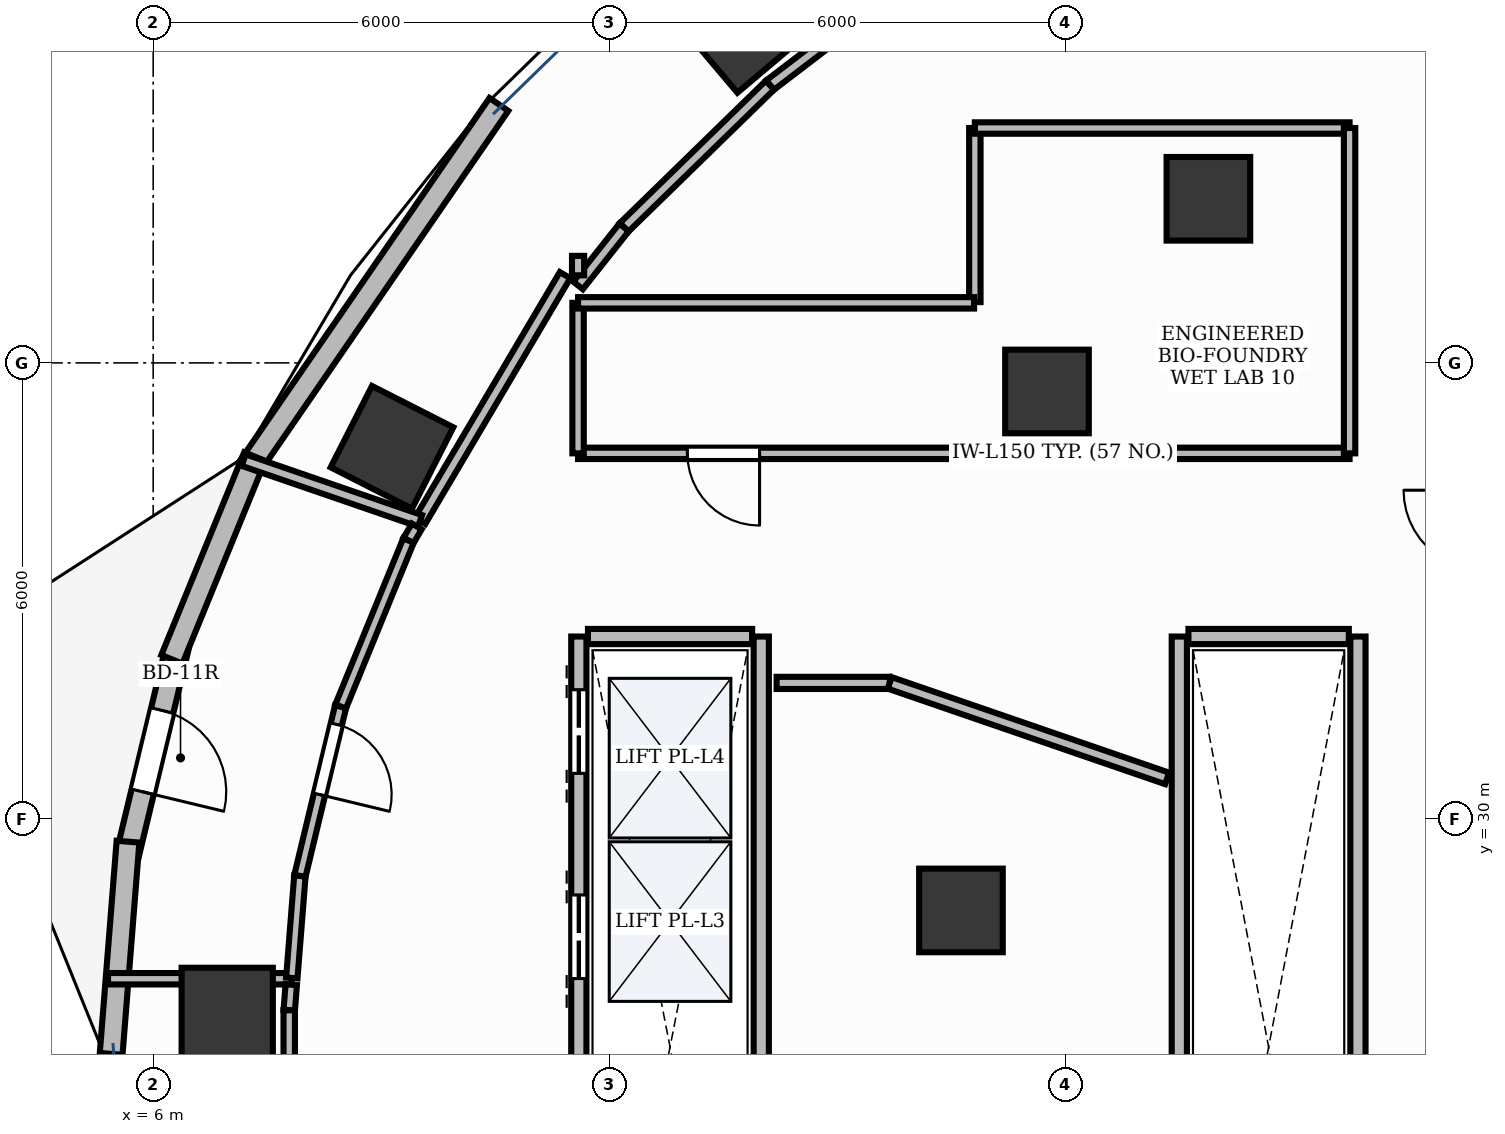
"""IFC4 building model, lengths in metres.
Left out: names, types, materials, properties, quantities, classifications, styles, units other than length and angle.
Written with IfcOpenShell. Run it as: python <this file> out.ifc"""

import sys

from ifc_helpers import new_model, si_unit, direction, frame, frame_2d, origin, origin_2d, place, context, subcontext, project, spatial, rectangle, extrude, element, fill, save


model = new_model("IFC4")
c1 = context("Model", 3, precision=1e-05, world=origin(), true_north=direction((0.0, 1.0)))
c2 = subcontext(c1, "Body", "Model", "MODEL_VIEW")
j1 = project(units=[si_unit("LENGTHUNIT", "METRE"), si_unit("PLANEANGLEUNIT", "RADIAN")], contexts=[c1])
p1 = place(None, origin())
s1 = spatial("IfcSite", under=j1, at=p1, CompositionType="ELEMENT")
p2 = place(p1, origin())
s2 = spatial("IfcBuilding", under=s1, at=p2, CompositionType="ELEMENT")
p3 = place(p2, frame((0.0, 0.0, 127.8)))
s3 = spatial("IfcBuildingStorey", under=s2, at=p3, CompositionType="ELEMENT", Elevation=127.8)
p4 = place(p3, frame((13.758, 40.4, -0.0), z_axis=(0.0, 0.0, 1.0), x_axis=(0.764246456939, 0.644924300253, 0.0)))
e1 = element("IfcColumn", 1, at=p4, inside=s3, PredefinedType="COLUMN", context=c2, shape_type="SweptSolid", body=[
    extrude(rectangle(XDim=1.2, YDim=1.2, at=origin_2d()), origin(), (0.0, 0.0, 1.0), 3.901),
])
p5 = place(p3, frame((19.883, 38.159, -0.0), z_axis=(0.0, 0.0, 1.0), x_axis=(1.0, 0.0, 0.0)))
e2 = element("IfcColumn", 2, at=p5, inside=s3, PredefinedType="COLUMN", context=c2, shape_type="SweptSolid", body=[
    extrude(rectangle(XDim=1.1, YDim=1.1, at=origin_2d()), origin(), (0.0, 0.0, 1.0), 3.901),
])
p6 = place(p3, frame((9.142, 34.889, -0.0), z_axis=(0.0, 0.0, 1.0), x_axis=(0.453057191132, 0.891481453292, 0.0)))
e3 = element("IfcColumn", 3, at=p6, inside=s3, PredefinedType="COLUMN", context=c2, shape_type="SweptSolid", body=[
    extrude(rectangle(XDim=1.2, YDim=1.2, at=origin_2d()), origin(), (0.0, 0.0, 1.0), 3.901),
])
p7 = place(p3, frame((17.759, 35.624, -0.0), z_axis=(0.0, 0.0, 1.0), x_axis=(1.0, 0.0, 0.0)))
e4 = element("IfcColumn", 4, at=p7, inside=s3, PredefinedType="COLUMN", context=c2, shape_type="SweptSolid", body=[
    extrude(rectangle(XDim=1.1, YDim=1.1, at=origin_2d()), origin(), (0.0, 0.0, 1.0), 3.901),
])
p8 = place(p3, frame((6.974, 27.442, -0.0), z_axis=(0.0, 0.0, 1.0), x_axis=(0.0, 1.0, 0.0)))
e5 = element("IfcColumn", 5, at=p8, inside=s3, PredefinedType="COLUMN", context=c2, shape_type="SweptSolid", body=[
    extrude(rectangle(XDim=1.2, YDim=1.2, at=origin_2d()), origin(), (0.0, 0.0, 1.0), 3.901),
])
p9 = place(p3, frame((16.627, 28.797, -0.0), z_axis=(0.0, 0.0, 1.0), x_axis=(1.0, 0.0, 0.0)))
e6 = element("IfcColumn", 6, at=p9, inside=s3, PredefinedType="COLUMN", context=c2, shape_type="SweptSolid", body=[
    extrude(rectangle(XDim=1.1, YDim=1.1, at=origin_2d()), origin(), (0.0, 0.0, 1.0), 3.901),
])
p10 = place(p3, frame((6.316, 32.248, 0.0), z_axis=(0.0, 0.0, 1.0), x_axis=(-0.233687533313, -0.972311748759, 0.0)))
e7 = element("IfcWall", 7, at=p10, inside=s3, PredefinedType="STANDARD", context=c2, shape_type="SweptSolid", body=[
    extrude(rectangle(XDim=2.788, YDim=0.3, at=frame_2d((1.394, 0.0))), origin(), (0.0, 0.0, 1.0), 3.9),
])
p11 = place(p10, frame((0.844, 0.0, 0.0)))
e8 = element("IfcOpeningElement", 8, at=p11, cuts=e7, PredefinedType="OPENING", context=c2, shape_type="SweptSolid", body=[
    extrude(rectangle(XDim=1.1, YDim=2.15, at=frame_2d((0.55, 1.075))), frame((0.0, 0.165, 0.0), z_axis=(0.0, -1.0, 0.0), x_axis=(1.0, 0.0, 0.0)), (0.0, 0.0, 1.0), 0.33),
])
p12 = place(p3, frame((10.548, 39.4, 0.0), z_axis=(0.0, 0.0, 1.0), x_axis=(-0.566825798999, -0.823837674296, 0.0)))
e9 = element("IfcWall", 9, at=p12, inside=s3, PredefinedType="STANDARD", context=c2, shape_type="SweptSolid", body=[
    extrude(rectangle(XDim=5.826, YDim=0.3, at=frame_2d((2.913, 0.0))), origin(), (0.0, 0.0, 1.0), 3.47),
])
p13 = place(p3, frame((7.336, 34.767, 0.0), z_axis=(0.0, 0.0, 1.0), x_axis=(-0.378421675944, -0.925633315722, 0.0)))
e10 = element("IfcWall", 10, at=p13, inside=s3, PredefinedType="STANDARD", context=c2, shape_type="SweptSolid", body=[
    extrude(rectangle(XDim=2.881, YDim=0.3, at=frame_2d((1.441, 0.0))), origin(), (0.0, 0.0, 1.0), 3.9),
])
p14 = place(p3, frame((5.669, 29.701, 0.0), z_axis=(0.0, 0.0, 1.0), x_axis=(-0.079062676622, -0.996869647028, 0.0)))
e11 = element("IfcWall", 11, at=p14, inside=s3, PredefinedType="STANDARD", context=c2, shape_type="SweptSolid", body=[
    extrude(rectangle(XDim=2.801, YDim=0.3, at=frame_2d((1.4, 0.0))), origin(), (0.0, 0.0, 1.0), 3.9),
])
p15 = place(p3, frame((11.6, 21.6, 0.0), z_axis=(0.0, 0.0, 1.0), x_axis=(0.0, 1.0, 0.0)))
e12 = element("IfcWall", 12, at=p15, inside=s3, PredefinedType="PARTITIONING", context=c2, shape_type="SweptSolid", body=[
    extrude(rectangle(XDim=10.8, YDim=0.2, at=frame_2d((5.4, 0.0))), origin(), (0.0, 0.0, 1.0), 2.91),
])
p16 = place(p15, frame((0.9, 0.0, 0.0)))
e13 = element("IfcOpeningElement", 13, at=p16, cuts=e12, PredefinedType="OPENING", context=c2, shape_type="SweptSolid", body=[
    extrude(rectangle(XDim=1.1, YDim=2.2, at=frame_2d((0.55, 1.1))), frame((0.0, 0.115, 0.0), z_axis=(0.0, -1.0, 0.0), x_axis=(1.0, 0.0, 0.0)), (0.0, 0.0, 1.0), 0.23),
])
p17 = place(p15, frame((3.6, 0.0, 0.0)))
e14 = element("IfcOpeningElement", 14, at=p17, cuts=e12, PredefinedType="OPENING", context=c2, shape_type="SweptSolid", body=[
    extrude(rectangle(XDim=1.1, YDim=2.2, at=frame_2d((0.55, 1.1))), frame((0.0, 0.115, 0.0), z_axis=(0.0, -1.0, 0.0), x_axis=(1.0, 0.0, 0.0)), (0.0, 0.0, 1.0), 0.23),
])
p18 = place(p15, frame((6.3, 0.0, 0.0)))
e15 = element("IfcOpeningElement", 15, at=p18, cuts=e12, PredefinedType="OPENING", context=c2, shape_type="SweptSolid", body=[
    extrude(rectangle(XDim=1.1, YDim=2.2, at=frame_2d((0.55, 1.1))), frame((0.0, 0.115, 0.0), z_axis=(0.0, -1.0, 0.0), x_axis=(1.0, 0.0, 0.0)), (0.0, 0.0, 1.0), 0.23),
])
p19 = place(p15, frame((9.0, 0.0, 0.0)))
e16 = element("IfcOpeningElement", 16, at=p19, cuts=e12, PredefinedType="OPENING", context=c2, shape_type="SweptSolid", body=[
    extrude(rectangle(XDim=1.1, YDim=2.2, at=frame_2d((0.55, 1.1))), frame((0.0, 0.115, 0.0), z_axis=(0.0, -1.0, 0.0), x_axis=(1.0, 0.0, 0.0)), (0.0, 0.0, 1.0), 0.23),
])
p20 = place(p3, frame((14.0, 21.6, 0.0), z_axis=(0.0, 0.0, 1.0), x_axis=(0.0, 1.0, 0.0)))
e17 = element("IfcWall", 17, at=p20, inside=s3, PredefinedType="PARTITIONING", context=c2, shape_type="SweptSolid", body=[
    extrude(rectangle(XDim=10.8, YDim=0.2, at=frame_2d((5.4, 0.0))), origin(), (0.0, 0.0, 1.0), 2.91),
])
p21 = place(p3, frame((11.72, 32.4, 0.0), z_axis=(0.0, 0.0, 1.0), x_axis=(1.0, 0.0, 0.0)))
e18 = element("IfcWall", 18, at=p21, inside=s3, PredefinedType="PARTITIONING", context=c2, shape_type="SweptSolid", body=[
    extrude(rectangle(XDim=2.16, YDim=0.2, at=frame_2d((1.08, 0.0))), origin(), (0.0, 0.0, 1.0), 2.91),
])
for number, where, z_axis, x_axis in (
    (19, (19.5, 21.6, 0.0), (0.0, 0.0, 1.0), (0.0, 1.0, 0.0)),
    (20, (21.85, 21.6, 0.0), (0.0, 0.0, 1.0), (0.0, 1.0, 0.0)),
):
    element("IfcWall", number, at=place(p3, frame(where, z_axis=z_axis, x_axis=x_axis)), inside=s3, PredefinedType="PARTITIONING", context=c2, shape_type="SweptSolid", body=[
        extrude(rectangle(XDim=10.8, YDim=0.2, at=frame_2d((5.4, 0.0))), origin(), (0.0, 0.0, 1.0), 2.91),
    ])
p22 = place(p3, frame((19.62, 32.4, 0.0), z_axis=(0.0, 0.0, 1.0), x_axis=(1.0, 0.0, 0.0)))
e21 = element("IfcWall", 21, at=p22, inside=s3, PredefinedType="PARTITIONING", context=c2, shape_type="SweptSolid", body=[
    extrude(rectangle(XDim=2.11, YDim=0.2, at=frame_2d((1.055, 0.0))), origin(), (0.0, 0.0, 1.0), 2.91),
])
p23 = place(p3, frame((21.74, 34.81, 0.0), z_axis=(0.0, 0.0, 1.0), x_axis=(-1.0, 0.0, 0.0)))
e22 = element("IfcWall", 22, at=p23, inside=s3, PredefinedType="PARTITIONING", context=c2, shape_type="SweptSolid", body=[
    extrude(rectangle(XDim=10.15, YDim=0.15, at=frame_2d((5.075, 0.0))), origin(), (0.0, 0.0, 1.0), 2.91),
])
p24 = place(p23, frame((7.762, 0.0, 0.0)))
e23 = element("IfcOpeningElement", 23, at=p24, cuts=e22, PredefinedType="OPENING", context=c2, shape_type="SweptSolid", body=[
    extrude(rectangle(XDim=0.95, YDim=2.15, at=frame_2d((0.475, 1.075))), frame((0.0, 0.09, 0.0), z_axis=(0.0, -1.0, 0.0), x_axis=(1.0, 0.0, 0.0)), (0.0, 0.0, 1.0), 0.18),
])
p25 = place(p3, frame((8.466, 31.479, 0.0), z_axis=(0.0, 0.0, 1.0), x_axis=(-0.233675196412, -0.972314713754, 0.0)))
e24 = element("IfcWall", 24, at=p25, inside=s3, PredefinedType="PARTITIONING", context=c2, shape_type="SweptSolid", body=[
    extrude(rectangle(XDim=2.291, YDim=0.15, at=frame_2d((1.146, 0.0))), origin(), (0.0, 0.0, 1.0), 2.91),
])
p26 = place(p25, frame((0.24, 0.0, 0.0)))
e25 = element("IfcOpeningElement", 25, at=p26, cuts=e24, PredefinedType="OPENING", context=c2, shape_type="SweptSolid", body=[
    extrude(rectangle(XDim=0.95, YDim=2.15, at=frame_2d((0.475, 1.075))), frame((0.0, 0.09, 0.0), z_axis=(0.0, -1.0, 0.0), x_axis=(1.0, 0.0, 0.0)), (0.0, 0.0, 1.0), 0.18),
])
p27 = place(p3, frame((14.202, 31.79, 0.0), z_axis=(0.0, 0.0, 1.0), x_axis=(1.0, 0.0, 0.0)))
e26 = element("IfcWall", 26, at=p27, inside=s3, PredefinedType="PARTITIONING", context=c2, shape_type="SweptSolid", body=[
    extrude(rectangle(XDim=1.489, YDim=0.16, at=frame_2d((0.744, 0.0))), origin(), (0.0, 0.0, 1.0), 2.91),
])
p28 = place(p3, frame((15.69, 31.79, 0.0), z_axis=(0.0, 0.0, 1.0), x_axis=(0.945518754025, -0.32556763627, 0.0)))
e27 = element("IfcWall", 27, at=p28, inside=s3, PredefinedType="PARTITIONING", context=c2, shape_type="SweptSolid", body=[
    extrude(rectangle(XDim=3.86, YDim=0.16, at=frame_2d((1.93, 0.0))), origin(), (0.0, 0.0, 1.0), 2.91),
])
p29 = place(p3, frame((5.406, 27.898, 0.0), z_axis=(0.0, 0.0, 1.0), x_axis=(1.0, 0.0, 0.0)))
e28 = element("IfcWall", 28, at=p29, inside=s3, PredefinedType="PARTITIONING", context=c2, shape_type="SweptSolid", body=[
    extrude(rectangle(XDim=2.417, YDim=0.15, at=frame_2d((1.208, 0.0))), origin(), (0.0, 0.0, 1.0), 2.91),
])
p30 = place(p3, frame((7.817, 27.82, 0.0), z_axis=(0.0, 0.0, 1.0), x_axis=(-0.078910750646, -0.996881684771, 0.0)))
e29 = element("IfcWall", 29, at=p30, inside=s3, PredefinedType="PARTITIONING", context=c2, shape_type="SweptSolid", body=[
    extrude(rectangle(XDim=0.337, YDim=0.15, at=frame_2d((0.168, 0.0))), origin(), (0.0, 0.0, 1.0), 2.91),
])
p31 = place(p3, frame((7.79, 27.483, 0.0), z_axis=(0.0, 0.0, 1.0), x_axis=(0.0, -1.0, 0.0)))
e30 = element("IfcWall", 30, at=p31, inside=s3, PredefinedType="PARTITIONING", context=c2, shape_type="SweptSolid", body=[
    extrude(rectangle(XDim=0.966, YDim=0.15, at=frame_2d((0.483, 0.0))), origin(), (0.0, 0.0, 1.0), 2.91),
])
p32 = place(p3, frame((16.339, 41.354, 0.0), z_axis=(0.0, 0.0, 1.0), x_axis=(-0.794513779695, -0.607246122981, 0.0)))
e31 = element("IfcWall", 31, at=p32, inside=s3, PredefinedType="PARTITIONING", context=c2, shape_type="SweptSolid", body=[
    extrude(rectangle(XDim=2.799, YDim=0.16, at=frame_2d((1.399, 0.0))), origin(), (0.0, 0.0, 1.0), 2.91),
])
p33 = place(p3, frame((14.114, 39.653, 0.0), z_axis=(0.0, 0.0, 1.0), x_axis=(-0.716161838398, -0.697934252794, 0.0)))
e32 = element("IfcWall", 32, at=p33, inside=s3, PredefinedType="PARTITIONING", context=c2, shape_type="SweptSolid", body=[
    extrude(rectangle(XDim=2.679, YDim=0.16, at=frame_2d((1.339, 0.0))), origin(), (0.0, 0.0, 1.0), 2.91),
])
p34 = place(p3, frame((12.195, 37.782, 0.0), z_axis=(0.0, 0.0, 1.0), x_axis=(-0.621081637991, -0.783745876513, 0.0)))
e33 = element("IfcWall", 33, at=p34, inside=s3, PredefinedType="PARTITIONING", context=c2, shape_type="SweptSolid", body=[
    extrude(rectangle(XDim=0.974, YDim=0.16, at=frame_2d((0.487, 0.0))), origin(), (0.0, 0.0, 1.0), 2.91),
])
p35 = place(p3, frame((11.59, 37.152, 0.0), z_axis=(0.0, 0.0, 1.0), x_axis=(0.0, 1.0, 0.0)))
e34 = element("IfcWall", 34, at=p35, inside=s3, PredefinedType="PARTITIONING", context=c2, shape_type="SweptSolid", body=[
    extrude(rectangle(XDim=0.256, YDim=0.16, at=frame_2d((0.128, 0.0))), origin(), (0.0, 0.0, 1.0), 2.91),
])
p36 = place(p3, frame((11.419, 37.154, 0.0), z_axis=(0.0, 0.0, 1.0), x_axis=(-0.508216412194, -0.861229399392, 0.0)))
e35 = element("IfcWall", 35, at=p36, inside=s3, PredefinedType="PARTITIONING", context=c2, shape_type="SweptSolid", body=[
    extrude(rectangle(XDim=3.753, YDim=0.16, at=frame_2d((1.876, 0.0))), origin(), (0.0, 0.0, 1.0), 2.91),
])
p37 = place(p3, frame((9.511, 33.922, 0.0), z_axis=(0.0, 0.0, 1.0), x_axis=(-0.945502944909, 0.325613545737, 0.0)))
e36 = element("IfcWall", 36, at=p37, inside=s3, PredefinedType="PARTITIONING", context=c2, shape_type="SweptSolid", body=[
    extrude(rectangle(XDim=2.454, YDim=0.16, at=frame_2d((1.227, 0.0))), origin(), (0.0, 0.0, 1.0), 2.91),
])
p38 = place(p3, frame((16.81, 36.8, 0.0), z_axis=(0.0, 0.0, 1.0), x_axis=(0.0, 1.0, 0.0)))
e37 = element("IfcWall", 37, at=p38, inside=s3, PredefinedType="PARTITIONING", context=c2, shape_type="SweptSolid", body=[
    extrude(rectangle(XDim=2.29, YDim=0.15, at=frame_2d((1.145, 0.0))), origin(), (0.0, 0.0, 1.0), 2.91),
])
p39 = place(p3, frame((16.81, 39.09, 0.0), z_axis=(0.0, 0.0, 1.0), x_axis=(1.0, 0.0, 0.0)))
e38 = element("IfcWall", 38, at=p39, inside=s3, PredefinedType="PARTITIONING", context=c2, shape_type="SweptSolid", body=[
    extrude(rectangle(XDim=4.93, YDim=0.15, at=frame_2d((2.465, 0.0))), origin(), (0.0, 0.0, 1.0), 2.91),
])
p40 = place(p3, frame((21.74, 39.09, 0.0), z_axis=(0.0, 0.0, 1.0), x_axis=(0.0, -1.0, 0.0)))
e39 = element("IfcWall", 39, at=p40, inside=s3, PredefinedType="PARTITIONING", context=c2, shape_type="SweptSolid", body=[
    extrude(rectangle(XDim=4.28, YDim=0.15, at=frame_2d((2.14, 0.0))), origin(), (0.0, 0.0, 1.0), 2.91),
])
p41 = place(p3, frame((11.59, 34.81, 0.0), z_axis=(0.0, 0.0, 1.0), x_axis=(0.0, 1.0, 0.0)))
e40 = element("IfcWall", 40, at=p41, inside=s3, PredefinedType="PARTITIONING", context=c2, shape_type="SweptSolid", body=[
    extrude(rectangle(XDim=1.98, YDim=0.15, at=frame_2d((0.99, 0.0))), origin(), (0.0, 0.0, 1.0), 2.91),
])
p42 = place(p3, frame((11.59, 36.79, 0.0), z_axis=(0.0, 0.0, 1.0), x_axis=(1.0, 0.0, 0.0)))
e41 = element("IfcWall", 41, at=p42, inside=s3, PredefinedType="PARTITIONING", context=c2, shape_type="SweptSolid", body=[
    extrude(rectangle(XDim=5.21, YDim=0.15, at=frame_2d((2.605, 0.0))), origin(), (0.0, 0.0, 1.0), 2.91),
])
p43 = place(p3, frame((9.468, 33.849, 0.0), z_axis=(0.0, 0.0, 1.0), x_axis=(-0.507963400782, -0.86137865278, 0.0)))
e42 = element("IfcWall", 42, at=p43, inside=s3, PredefinedType="PARTITIONING", context=c2, shape_type="SweptSolid", body=[
    extrude(rectangle(XDim=0.215, YDim=0.15, at=frame_2d((0.107, 0.0))), origin(), (0.0, 0.0, 1.0), 2.91),
])
p44 = place(p3, frame((9.358, 33.663, 0.0), z_axis=(0.0, 0.0, 1.0), x_axis=(-0.378306283753, -0.925680482495, 0.0)))
e43 = element("IfcWall", 43, at=p44, inside=s3, PredefinedType="PARTITIONING", context=c2, shape_type="SweptSolid", body=[
    extrude(rectangle(XDim=2.358, YDim=0.15, at=frame_2d((1.179, 0.0))), origin(), (0.0, 0.0, 1.0), 2.91),
])
p45 = place(p3, frame((7.93, 29.249, 0.0), z_axis=(0.0, 0.0, 1.0), x_axis=(-0.079110576853, -0.996865846857, 0.0)))
e44 = element("IfcWall", 44, at=p45, inside=s3, PredefinedType="PARTITIONING", context=c2, shape_type="SweptSolid", body=[
    extrude(rectangle(XDim=1.345, YDim=0.15, at=frame_2d((0.673, 0.0))), origin(), (0.0, 0.0, 1.0), 2.91),
])
p46 = place(p11, origin())
e45 = element("IfcDoor", 45, at=p46, inside=s3, OperationType="SINGLE_SWING_RIGHT", PredefinedType="DOOR", context=c2, shape_type="SweptSolid", body=[
    extrude(rectangle(XDim=1.1, YDim=2.15, at=frame_2d((0.55, 1.075))), frame((0.0, 0.025, 0.0), z_axis=(0.0, -1.0, 0.0), x_axis=(1.0, 0.0, 0.0)), (0.0, 0.0, 1.0), 0.05),
])
fill(e8, e45)
p47 = place(p18, origin())
e46 = element("IfcDoor", 46, at=p47, inside=s3, OperationType="DOUBLE_DOOR_SLIDING", PredefinedType="DOOR", context=c2, shape_type="SweptSolid", body=[
    extrude(rectangle(XDim=1.1, YDim=2.2, at=frame_2d((0.55, 1.1))), frame((0.0, 0.025, 0.0), z_axis=(0.0, -1.0, 0.0), x_axis=(1.0, 0.0, 0.0)), (0.0, 0.0, 1.0), 0.05),
])
fill(e15, e46)
p48 = place(p19, origin())
e47 = element("IfcDoor", 47, at=p48, inside=s3, OperationType="DOUBLE_DOOR_SLIDING", PredefinedType="DOOR", context=c2, shape_type="SweptSolid", body=[
    extrude(rectangle(XDim=1.1, YDim=2.2, at=frame_2d((0.55, 1.1))), frame((0.0, 0.025, 0.0), z_axis=(0.0, -1.0, 0.0), x_axis=(1.0, 0.0, 0.0)), (0.0, 0.0, 1.0), 0.05),
])
fill(e16, e47)
p49 = place(p24, origin())
e48 = element("IfcDoor", 48, at=p49, inside=s3, OperationType="SINGLE_SWING_LEFT", PredefinedType="DOOR", context=c2, shape_type="SweptSolid", body=[
    extrude(rectangle(XDim=0.95, YDim=2.15, at=frame_2d((0.475, 1.075))), frame((0.0, 0.025, 0.0), z_axis=(0.0, -1.0, 0.0), x_axis=(1.0, 0.0, 0.0)), (0.0, 0.0, 1.0), 0.05),
])
fill(e23, e48)
p50 = place(p26, origin())
e49 = element("IfcDoor", 49, at=p50, inside=s3, OperationType="SINGLE_SWING_RIGHT", PredefinedType="DOOR", context=c2, shape_type="SweptSolid", body=[
    extrude(rectangle(XDim=0.95, YDim=2.15, at=frame_2d((0.475, 1.075))), frame((0.0, 0.025, 0.0), z_axis=(0.0, -1.0, 0.0), x_axis=(1.0, 0.0, 0.0)), (0.0, 0.0, 1.0), 0.05),
])
fill(e25, e49)
save(model, sys.argv[1])
